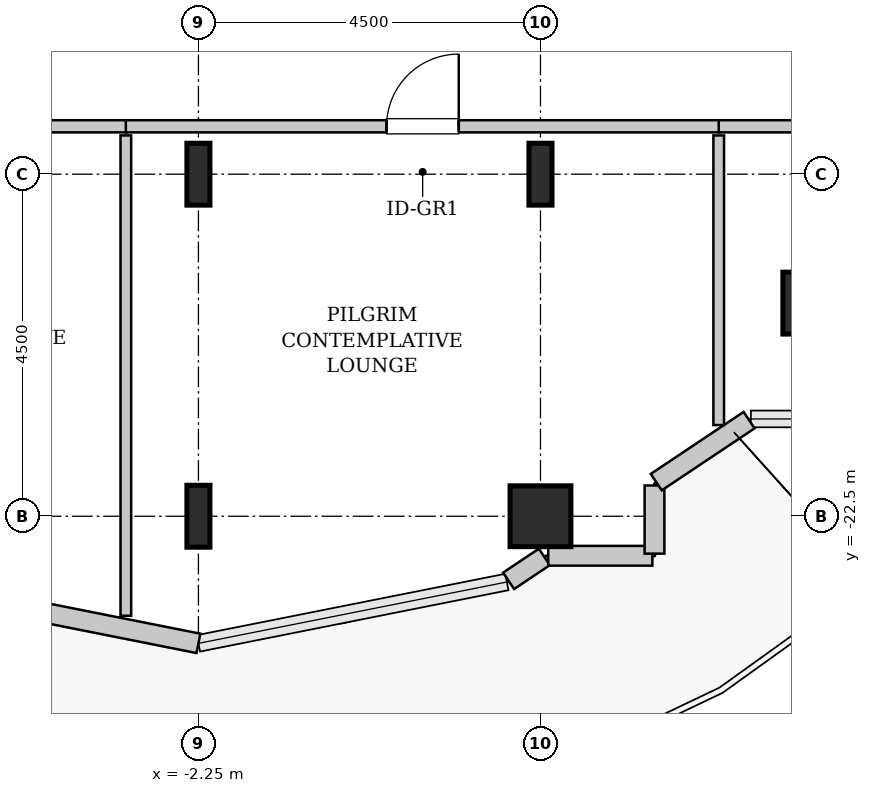
"""IFC4 building model, lengths in metres.
Left out: names, types, materials, properties, quantities, classifications, styles, units other than length and angle.
Written with IfcOpenShell. Run it as: python <this file> out.ifc"""

import sys

from ifc_helpers import new_model, si_unit, direction, frame, frame_2d, origin, origin_2d, place, context, subcontext, project, spatial, rectangle, hollow_rectangle, i_section, extrude, source, transform, mapped, element, fill, save


model = new_model("IFC4")
c1 = context("Model", 3, precision=1e-05, world=origin(), true_north=direction((0.0, 1.0)))
c2 = subcontext(c1, "Body", "Model", "MODEL_VIEW")
j1 = project(units=[si_unit("LENGTHUNIT", "METRE"), si_unit("PLANEANGLEUNIT", "RADIAN")], contexts=[c1])
p1 = place(None, origin())
s1 = spatial("IfcSite", under=j1, at=p1, CompositionType="ELEMENT")
p2 = place(p1, origin())
s2 = spatial("IfcBuilding", under=s1, at=p2, CompositionType="ELEMENT")
p3 = place(p2, frame((0.0, 0.0, 194.4)))
s3 = spatial("IfcBuildingStorey", under=s2, at=p3, CompositionType="ELEMENT", Elevation=194.4)
m1 = source(origin(), c2, "Body", "SweptSolid", [
    extrude(i_section(OverallWidth=0.303, OverallDepth=0.814, WebThickness=0.021, FlangeThickness=0.04, FilletRadius=0.03, at=origin_2d()), origin(), (0.0, 0.0, 1.0), 3.8),
])
for number, where, z_axis, x_axis in (
    (1, (-2.25, -22.5, 0.0), (0.0, 0.0, 1.0), (1.0, 0.0, 0.0)),
    (2, (-2.25, -18.0, 0.0), (0.0, 0.0, 1.0), (1.0, 0.0, 0.0)),
):
    element("IfcColumn", number, at=place(p3, frame(where, z_axis=z_axis, x_axis=x_axis)), inside=s3, PredefinedType="COLUMN", context=c2, shape_type="MappedRepresentation", body=[
        mapped(m1, transform((0.0, 0.0, 0.0), x_axis=(1.0, 0.0, 0.0), y_axis=(0.0, 1.0, 0.0), z_axis=(0.0, 0.0, 1.0), scale=1.0)),
    ])
m2 = source(origin(), c2, "Body", "SweptSolid", [
    extrude(hollow_rectangle(XDim=0.8, YDim=0.8, WallThickness=0.04, InnerFilletRadius=0.04, OuterFilletRadius=0.08, at=origin_2d()), origin(), (0.0, 0.0, 1.0), 3.8),
])
p4 = place(p3, frame((2.25, -22.5, 0.0), z_axis=(0.0, 0.0, 1.0), x_axis=(1.0, 0.0, 0.0)))
e3 = element("IfcColumn", 3, at=p4, inside=s3, PredefinedType="COLUMN", context=c2, shape_type="MappedRepresentation", body=[
    mapped(m2, transform((0.0, 0.0, 0.0), x_axis=(1.0, 0.0, 0.0), y_axis=(0.0, 1.0, 0.0), z_axis=(0.0, 0.0, 1.0), scale=1.0)),
])
for number, where, z_axis, x_axis in (
    (4, (2.25, -18.0, 0.0), (0.0, 0.0, 1.0), (1.0, 0.0, 0.0)),
    (5, (5.591, -19.696, 0.0), (0.0, 0.0, 1.0), (1.0, 0.0, 0.0)),
):
    element("IfcColumn", number, at=place(p3, frame(where, z_axis=z_axis, x_axis=x_axis)), inside=s3, PredefinedType="COLUMN", context=c2, shape_type="MappedRepresentation", body=[
        mapped(m1, transform((0.0, 0.0, 0.0), x_axis=(1.0, 0.0, 0.0), y_axis=(0.0, 1.0, 0.0), z_axis=(0.0, 0.0, 1.0), scale=1.0)),
    ])
m3 = source(origin(), c2, "Body", "SweptSolid", [
    extrude(rectangle(XDim=4.137, YDim=0.26, at=frame_2d((2.068, 0.0))), origin(), (0.0, 0.0, 1.0), 3.55),
])
p5 = place(p3, frame((-6.307, -23.365, 0.0), z_axis=(0.0, 0.0, 1.0), x_axis=(0.980782170794, -0.195105954428, 0.0)))
e6 = element("IfcWall", 6, at=p5, inside=s3, PredefinedType="SOLIDWALL", context=c2, shape_type="MappedRepresentation", body=[
    mapped(m3, transform((0.0, 0.0, 0.0), x_axis=(1.0, 0.0, 0.0), y_axis=(0.0, 1.0, 0.0), z_axis=(0.0, 0.0, 1.0), scale=1.0)),
])
p6 = place(p5, frame((0.488, 0.0, 0.0)))
e7 = element("IfcOpeningElement", 7, at=p6, cuts=e6, PredefinedType="OPENING", context=c2, shape_type="SweptSolid", body=[
    extrude(rectangle(XDim=1.1, YDim=2.2, at=frame_2d((0.55, 1.1))), frame((0.0, 0.14, 0.0), z_axis=(0.0, -1.0, 0.0), x_axis=(1.0, 0.0, 0.0)), (0.0, 0.0, 1.0), 0.28),
])
m4 = source(origin(), c2, "Body", "SweptSolid", [
    extrude(rectangle(XDim=0.565, YDim=0.26, at=frame_2d((0.283, 0.0))), origin(), (0.0, 0.0, 1.0), 3.55),
])
p7 = place(p3, frame((1.831, -23.35, 0.0), z_axis=(0.0, 0.0, 1.0), x_axis=(0.831651492666, 0.555297933317, 0.0)))
e8 = element("IfcWall", 8, at=p7, inside=s3, PredefinedType="SOLIDWALL", context=c2, shape_type="MappedRepresentation", body=[
    mapped(m4, transform((0.0, 0.0, 0.0), x_axis=(1.0, 0.0, 0.0), y_axis=(0.0, 1.0, 0.0), z_axis=(0.0, 0.0, 1.0), scale=1.0)),
])
m5 = source(origin(), c2, "Body", "SweptSolid", [
    extrude(rectangle(XDim=1.37, YDim=0.26, at=frame_2d((0.685, 0.0))), origin(), (0.0, 0.0, 1.0), 3.55),
])
p8 = place(p3, frame((2.352, -23.02, 0.0), z_axis=(0.0, 0.0, 1.0), x_axis=(1.0, 0.0, 0.0)))
e9 = element("IfcWall", 9, at=p8, inside=s3, PredefinedType="SOLIDWALL", context=c2, shape_type="MappedRepresentation", body=[
    mapped(m5, transform((0.0, 0.0, 0.0), x_axis=(1.0, 0.0, 0.0), y_axis=(0.0, 1.0, 0.0), z_axis=(0.0, 0.0, 1.0), scale=1.0)),
])
m6 = source(origin(), c2, "Body", "SweptSolid", [
    extrude(rectangle(XDim=0.897, YDim=0.26, at=frame_2d((0.448, 0.0))), origin(), (0.0, 0.0, 1.0), 3.55),
])
p9 = place(p3, frame((3.75, -22.992, 0.0), z_axis=(0.0, 0.0, 1.0), x_axis=(0.0, 1.0, 0.0)))
e10 = element("IfcWall", 10, at=p9, inside=s3, PredefinedType="SOLIDWALL", context=c2, shape_type="MappedRepresentation", body=[
    mapped(m6, transform((0.0, 0.0, 0.0), x_axis=(1.0, 0.0, 0.0), y_axis=(0.0, 1.0, 0.0), z_axis=(0.0, 0.0, 1.0), scale=1.0)),
])
m7 = source(origin(), c2, "Body", "SweptSolid", [
    extrude(rectangle(XDim=1.469, YDim=0.26, at=frame_2d((0.734, 0.0))), origin(), (0.0, 0.0, 1.0), 3.55),
])
p10 = place(p3, frame((3.773, -22.052, 0.0), z_axis=(0.0, 0.0, 1.0), x_axis=(0.831461760506, 0.555581983884, 0.0)))
e11 = element("IfcWall", 11, at=p10, inside=s3, PredefinedType="SOLIDWALL", context=c2, shape_type="MappedRepresentation", body=[
    mapped(m7, transform((0.0, 0.0, 0.0), x_axis=(1.0, 0.0, 0.0), y_axis=(0.0, 1.0, 0.0), z_axis=(0.0, 0.0, 1.0), scale=1.0)),
])
m8 = source(origin(), c2, "Body", "SweptSolid", [
    extrude(rectangle(XDim=6.81, YDim=0.16, at=frame_2d((3.405, 0.0))), origin(), (0.0, 0.0, 1.0), 3.535),
])
p11 = place(p3, frame((-10.005, -17.37, 0.0), z_axis=(0.0, 0.0, 1.0), x_axis=(1.0, 0.0, 0.0)))
e12 = element("IfcWall", 12, at=p11, inside=s3, PredefinedType="PARTITIONING", context=c2, shape_type="MappedRepresentation", body=[
    mapped(m8, transform((0.0, 0.0, 0.0), x_axis=(1.0, 0.0, 0.0), y_axis=(0.0, 1.0, 0.0), z_axis=(0.0, 0.0, 1.0), scale=1.0)),
])
p12 = place(p11, frame((3.778, 0.0, 0.0)))
e13 = element("IfcOpeningElement", 13, at=p12, cuts=e12, PredefinedType="OPENING", context=c2, shape_type="SweptSolid", body=[
    extrude(rectangle(XDim=0.95, YDim=2.1, at=frame_2d((0.475, 1.05))), frame((0.0, 0.09, 0.0), z_axis=(0.0, -1.0, 0.0), x_axis=(1.0, 0.0, 0.0)), (0.0, 0.0, 1.0), 0.18),
])
m9 = source(origin(), c2, "Body", "SweptSolid", [
    extrude(rectangle(XDim=6.319, YDim=0.14, at=frame_2d((3.16, 0.0))), origin(), (0.0, 0.0, 1.0), 3.535),
])
p13 = place(p3, frame((-3.205, -23.809, 0.0), z_axis=(0.0, 0.0, 1.0), x_axis=(0.0, 1.0, 0.0)))
e14 = element("IfcWall", 14, at=p13, inside=s3, PredefinedType="PARTITIONING", context=c2, shape_type="MappedRepresentation", body=[
    mapped(m9, transform((0.0, 0.0, 0.0), x_axis=(1.0, 0.0, 0.0), y_axis=(0.0, 1.0, 0.0), z_axis=(0.0, 0.0, 1.0), scale=1.0)),
])
m10 = source(origin(), c2, "Body", "SweptSolid", [
    extrude(rectangle(XDim=7.81, YDim=0.16, at=frame_2d((3.905, 0.0))), origin(), (0.0, 0.0, 1.0), 3.535),
])
p14 = place(p3, frame((-3.205, -17.37, 0.0), z_axis=(0.0, 0.0, 1.0), x_axis=(1.0, 0.0, 0.0)))
e15 = element("IfcWall", 15, at=p14, inside=s3, PredefinedType="PARTITIONING", context=c2, shape_type="MappedRepresentation", body=[
    mapped(m10, transform((0.0, 0.0, 0.0), x_axis=(1.0, 0.0, 0.0), y_axis=(0.0, 1.0, 0.0), z_axis=(0.0, 0.0, 1.0), scale=1.0)),
])
p15 = place(p14, frame((3.43, 0.0, 0.0)))
e16 = element("IfcOpeningElement", 16, at=p15, cuts=e15, PredefinedType="OPENING", context=c2, shape_type="SweptSolid", body=[
    extrude(rectangle(XDim=0.95, YDim=2.1, at=frame_2d((0.475, 1.05))), frame((0.0, 0.09, 0.0), z_axis=(0.0, -1.0, 0.0), x_axis=(1.0, 0.0, 0.0)), (0.0, 0.0, 1.0), 0.18),
])
m11 = source(origin(), c2, "Body", "SweptSolid", [
    extrude(rectangle(XDim=3.811, YDim=0.14, at=frame_2d((1.905, 0.0))), origin(), (0.0, 0.0, 1.0), 3.535),
])
p16 = place(p3, frame((4.595, -21.301, 0.0), z_axis=(0.0, 0.0, 1.0), x_axis=(0.0, 1.0, 0.0)))
e17 = element("IfcWall", 17, at=p16, inside=s3, PredefinedType="PARTITIONING", context=c2, shape_type="MappedRepresentation", body=[
    mapped(m11, transform((0.0, 0.0, 0.0), x_axis=(1.0, 0.0, 0.0), y_axis=(0.0, 1.0, 0.0), z_axis=(0.0, 0.0, 1.0), scale=1.0)),
])
m12 = source(origin(), c2, "Body", "SweptSolid", [
    extrude(rectangle(XDim=9.025, YDim=0.16, at=frame_2d((4.513, 0.0))), origin(), (0.0, 0.0, 1.0), 3.535),
])
p17 = place(p3, frame((4.595, -17.37, 0.0), z_axis=(0.0, 0.0, 1.0), x_axis=(1.0, 0.0, 0.0)))
e18 = element("IfcWall", 18, at=p17, inside=s3, PredefinedType="PARTITIONING", context=c2, shape_type="MappedRepresentation", body=[
    mapped(m12, transform((0.0, 0.0, 0.0), x_axis=(1.0, 0.0, 0.0), y_axis=(0.0, 1.0, 0.0), z_axis=(0.0, 0.0, 1.0), scale=1.0)),
])
p18 = place(p17, frame((4.038, 0.0, 0.0)))
e19 = element("IfcOpeningElement", 19, at=p18, cuts=e18, PredefinedType="OPENING", context=c2, shape_type="SweptSolid", body=[
    extrude(rectangle(XDim=0.95, YDim=2.1, at=frame_2d((0.475, 1.05))), frame((0.0, 0.09, 0.0), z_axis=(0.0, -1.0, 0.0), x_axis=(1.0, 0.0, 0.0)), (0.0, 0.0, 1.0), 0.18),
])
m13 = source(origin(), c2, "Body", "SweptSolid", [
    extrude(rectangle(XDim=0.95, YDim=2.1, at=frame_2d((0.475, 1.05))), frame((0.0, 0.025, 0.0), z_axis=(0.0, -1.0, 0.0), x_axis=(1.0, 0.0, 0.0)), (0.0, 0.0, 1.0), 0.05),
])
p19 = place(p15, origin())
e20 = element("IfcDoor", 20, at=p19, inside=s3, OperationType="SINGLE_SWING_RIGHT", PredefinedType="DOOR", context=c2, shape_type="MappedRepresentation", body=[
    mapped(m13, transform((0.0, 0.0, 0.0), x_axis=(1.0, 0.0, 0.0), y_axis=(0.0, 1.0, 0.0), z_axis=(0.0, 0.0, 1.0), scale=1.0)),
])
fill(e16, e20)
save(model, sys.argv[1])
